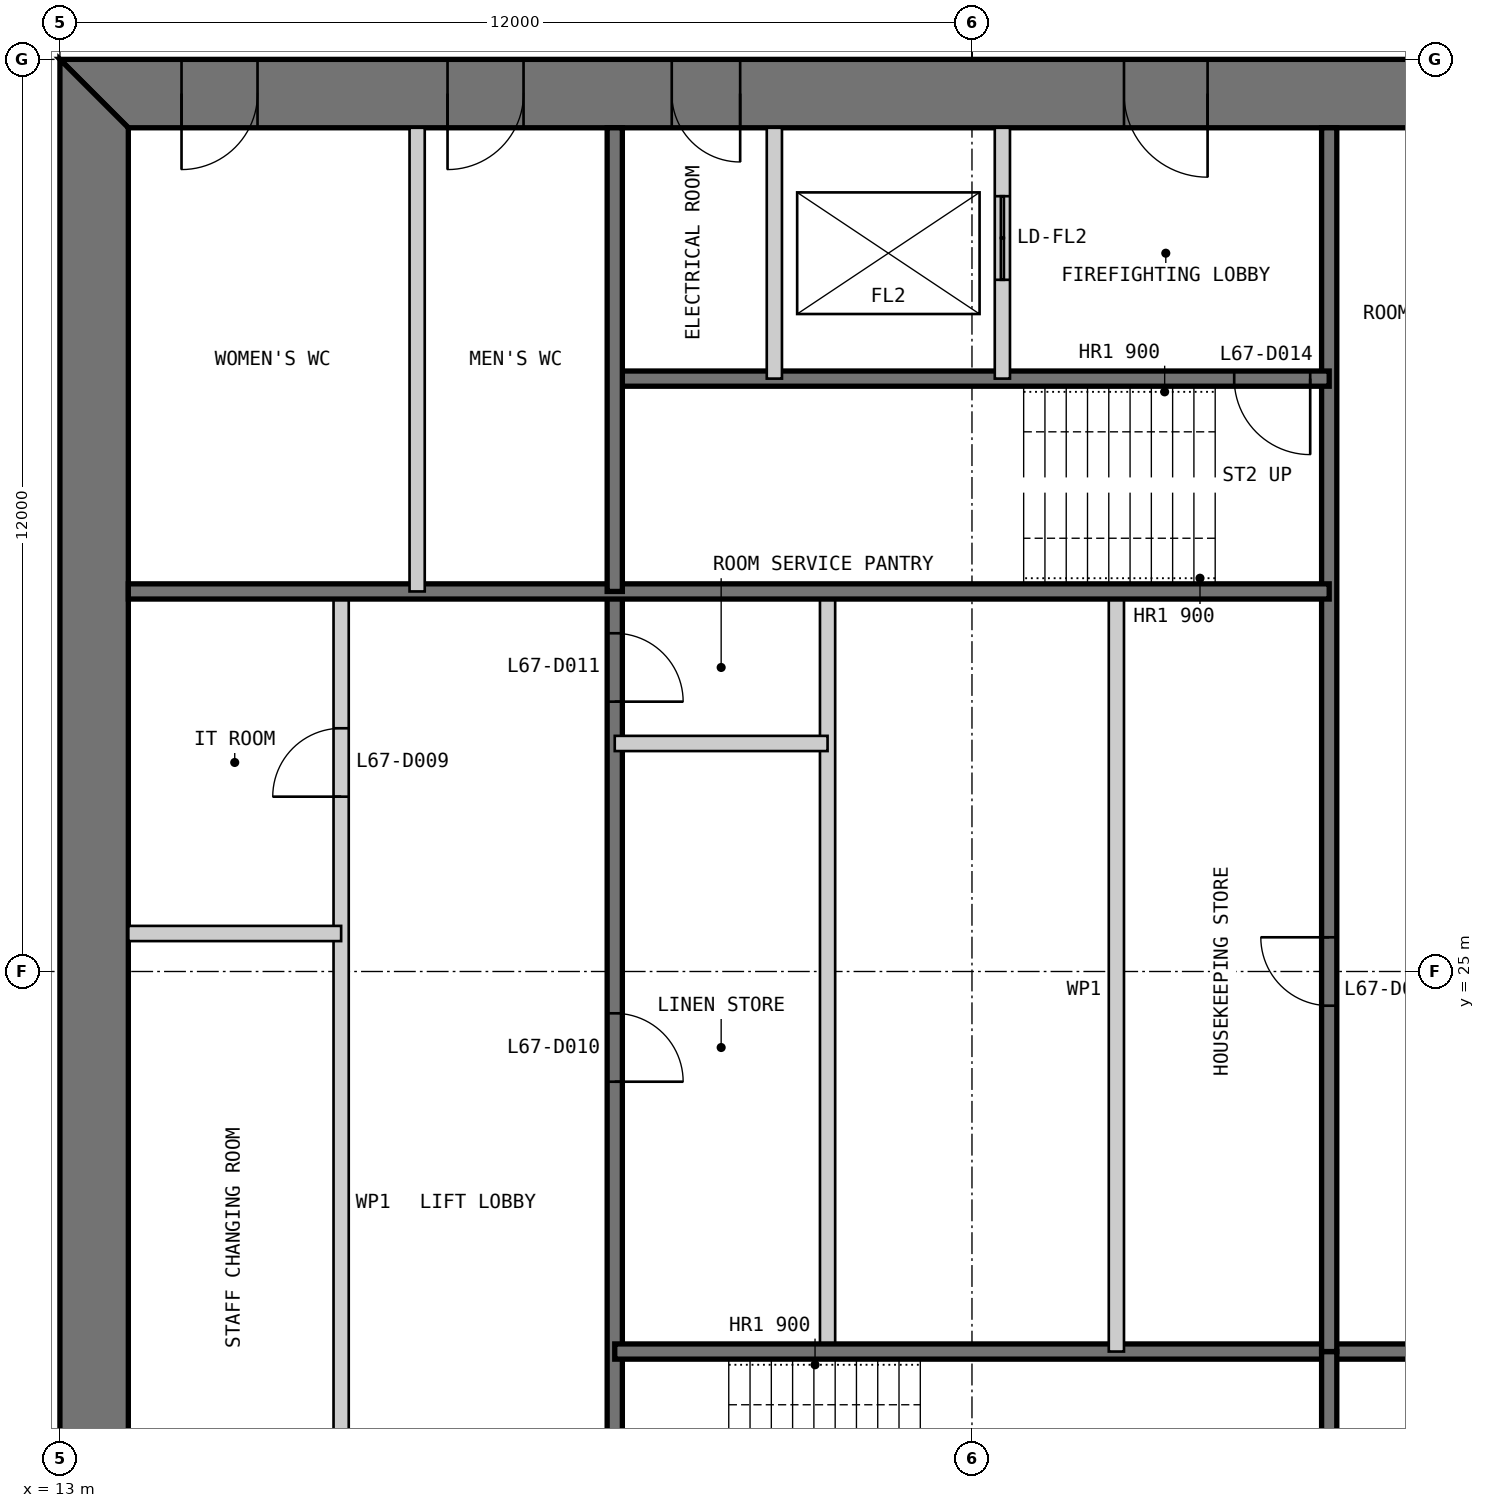
"""IFC4 building model, lengths in metres.
Left out: names, types, materials, properties, quantities, classifications, styles, units other than length and angle.
Written with IfcOpenShell. Run it as: python <this file> out.ifc"""

import sys

from ifc_helpers import new_model, si_unit, direction, frame, frame_2d, origin, place, context, subcontext, project, spatial, polyline, rectangle, outline, extrude, element, fill, save


model = new_model("IFC4")
c1 = context("Model", 3, precision=1e-05, world=origin(), true_north=direction((0.0, 1.0)))
c2 = subcontext(c1, "Body", "Model", "MODEL_VIEW")
j1 = project(units=[si_unit("LENGTHUNIT", "METRE"), si_unit("PLANEANGLEUNIT", "RADIAN")], contexts=[c1])
p1 = place(None, origin())
s1 = spatial("IfcSite", under=j1, at=p1, CompositionType="ELEMENT")
p2 = place(p1, origin())
s2 = spatial("IfcBuilding", under=s1, at=p2, CompositionType="ELEMENT")
p3 = place(p2, frame((0.0, 0.0, 279.8)))
s3 = spatial("IfcBuildingStorey", under=s2, at=p3, CompositionType="ELEMENT", Elevation=279.8)
p4 = place(p3, frame((37.0, 36.55, 0.0), z_axis=(0.0, 0.0, 1.0), x_axis=(-1.0, 0.0, 0.0)))
e1 = element("IfcWall", 1, at=p4, inside=s3, PredefinedType="SHEAR", context=c2, shape_type="SweptSolid", body=[
    extrude(outline(polyline([(0.0, -0.45), (24.0, -0.45), (23.1, 0.45), (0.9, 0.45), (0.0, -0.45)])), origin(), (0.0, 0.0, 1.0), 3.4),
])
p5 = place(p4, frame((4.9, 0.0, 0.0)))
e2 = element("IfcOpeningElement", 2, at=p5, cuts=e1, PredefinedType="OPENING", context=c2, shape_type="SweptSolid", body=[
    extrude(rectangle(XDim=1.0, YDim=2.2, at=frame_2d((0.5, 1.1))), frame((0.0, 0.46, 0.0), z_axis=(0.0, -1.0, 0.0), x_axis=(1.0, 0.0, 0.0)), (0.0, 0.0, 1.0), 0.92),
])
p6 = place(p4, frame((8.9, 0.0, 0.0)))
e3 = element("IfcOpeningElement", 3, at=p6, cuts=e1, PredefinedType="OPENING", context=c2, shape_type="SweptSolid", body=[
    extrude(rectangle(XDim=1.1, YDim=2.2, at=frame_2d((0.55, 1.1))), frame((0.0, 0.46, 0.0), z_axis=(0.0, -1.0, 0.0), x_axis=(1.0, 0.0, 0.0)), (0.0, 0.0, 1.0), 0.92),
])
p7 = place(p4, frame((15.05, 0.0, 0.0)))
e4 = element("IfcOpeningElement", 4, at=p7, cuts=e1, PredefinedType="OPENING", context=c2, shape_type="SweptSolid", body=[
    extrude(rectangle(XDim=0.9, YDim=2.2, at=frame_2d((0.45, 1.1))), frame((0.0, 0.46, 0.0), z_axis=(0.0, -1.0, 0.0), x_axis=(1.0, 0.0, 0.0)), (0.0, 0.0, 1.0), 0.92),
])
p8 = place(p4, frame((17.9, 0.0, 0.0)))
e5 = element("IfcOpeningElement", 5, at=p8, cuts=e1, PredefinedType="OPENING", context=c2, shape_type="SweptSolid", body=[
    extrude(rectangle(XDim=1.0, YDim=2.2, at=frame_2d((0.5, 1.1))), frame((0.0, 0.46, 0.0), z_axis=(0.0, -1.0, 0.0), x_axis=(1.0, 0.0, 0.0)), (0.0, 0.0, 1.0), 0.92),
])
p9 = place(p4, frame((21.4, 0.0, 0.0)))
e6 = element("IfcOpeningElement", 6, at=p9, cuts=e1, PredefinedType="OPENING", context=c2, shape_type="SweptSolid", body=[
    extrude(rectangle(XDim=1.0, YDim=2.2, at=frame_2d((0.5, 1.1))), frame((0.0, 0.46, 0.0), z_axis=(0.0, -1.0, 0.0), x_axis=(1.0, 0.0, 0.0)), (0.0, 0.0, 1.0), 0.92),
])
p10 = place(p3, frame((13.45, 36.1, 0.0), z_axis=(0.0, 0.0, 1.0), x_axis=(0.0, -1.0, 0.0)))
e7 = element("IfcWall", 7, at=p10, inside=s3, PredefinedType="SHEAR", context=c2, shape_type="SweptSolid", body=[
    extrude(outline(polyline([(-0.9, -0.45), (23.1, -0.45), (22.2, 0.45), (0.0, 0.45), (-0.9, -0.45)])), origin(), (0.0, 0.0, 1.0), 3.4),
])
p11 = place(p10, frame((20.2, 0.0, 0.0)))
e8 = element("IfcOpeningElement", 8, at=p11, cuts=e7, PredefinedType="OPENING", context=c2, shape_type="SweptSolid", body=[
    extrude(rectangle(XDim=1.0, YDim=2.2, at=frame_2d((0.5, 1.1))), frame((0.0, 0.46, 0.0), z_axis=(0.0, -1.0, 0.0), x_axis=(1.0, 0.0, 0.0)), (0.0, 0.0, 1.0), 0.92),
])
p12 = place(p10, frame((17.25, 0.0, 0.0)))
e9 = element("IfcOpeningElement", 9, at=p12, cuts=e7, PredefinedType="OPENING", context=c2, shape_type="SweptSolid", body=[
    extrude(rectangle(XDim=0.9, YDim=2.2, at=frame_2d((0.45, 1.1))), frame((0.0, 0.46, 0.0), z_axis=(0.0, -1.0, 0.0), x_axis=(1.0, 0.0, 0.0)), (0.0, 0.0, 1.0), 0.92),
])
p13 = place(p3, frame((16.7, 13.9, 0.0), z_axis=(0.0, 0.0, 1.0), x_axis=(0.0, 1.0, 0.0)))
e10 = element("IfcWall", 10, at=p13, inside=s3, PredefinedType="PARTITIONING", context=c2, shape_type="SweptSolid", body=[
    extrude(rectangle(XDim=16.1, YDim=0.2, at=frame_2d((8.05, 0.0))), origin(), (0.0, 0.0, 1.0), 3.2),
])
p14 = place(p13, frame((13.4, 0.0, 0.0)))
e11 = element("IfcOpeningElement", 11, at=p14, cuts=e10, PredefinedType="OPENING", context=c2, shape_type="SweptSolid", body=[
    extrude(rectangle(XDim=0.9, YDim=2.2, at=frame_2d((0.45, 1.1))), frame((0.0, 0.11, 0.0), z_axis=(0.0, -1.0, 0.0), x_axis=(1.0, 0.0, 0.0)), (0.0, 0.0, 1.0), 0.22),
])
p15 = place(p3, frame((20.3, 13.9, 0.0), z_axis=(0.0, 0.0, 1.0), x_axis=(0.0, 1.0, 0.0)))
e12 = element("IfcWall", 12, at=p15, inside=s3, PredefinedType="SOLIDWALL", context=c2, shape_type="SweptSolid", body=[
    extrude(rectangle(XDim=16.1, YDim=0.2, at=frame_2d((8.05, 0.0))), origin(), (0.0, 0.0, 1.0), 3.2),
])
p16 = place(p15, frame((9.65, 0.0, 0.0)))
e13 = element("IfcOpeningElement", 13, at=p16, cuts=e12, PredefinedType="OPENING", context=c2, shape_type="SweptSolid", body=[
    extrude(rectangle(XDim=0.9, YDim=2.2, at=frame_2d((0.45, 1.1))), frame((0.0, 0.11, 0.0), z_axis=(0.0, -1.0, 0.0), x_axis=(1.0, 0.0, 0.0)), (0.0, 0.0, 1.0), 0.22),
])
p17 = place(p15, frame((14.65, 0.0, 0.0)))
e14 = element("IfcOpeningElement", 14, at=p17, cuts=e12, PredefinedType="OPENING", context=c2, shape_type="SweptSolid", body=[
    extrude(rectangle(XDim=0.9, YDim=2.2, at=frame_2d((0.45, 1.1))), frame((0.0, 0.11, 0.0), z_axis=(0.0, -1.0, 0.0), x_axis=(1.0, 0.0, 0.0)), (0.0, 0.0, 1.0), 0.22),
])
p18 = place(p3, frame((23.1, 20.0, 0.0), z_axis=(0.0, 0.0, 1.0), x_axis=(0.0, 1.0, 0.0)))
e15 = element("IfcWall", 15, at=p18, inside=s3, PredefinedType="PARTITIONING", context=c2, shape_type="SweptSolid", body=[
    extrude(rectangle(XDim=10.0, YDim=0.2, at=frame_2d((5.0, 0.0))), origin(), (0.0, 0.0, 1.0), 3.2),
])
p19 = place(p3, frame((20.3, 20.0, 0.0), z_axis=(0.0, 0.0, 1.0), x_axis=(1.0, 0.0, 0.0)))
e16 = element("IfcWall", 16, at=p19, inside=s3, PredefinedType="SOLIDWALL", context=c2, shape_type="SweptSolid", body=[
    extrude(rectangle(XDim=15.8, YDim=0.2, at=frame_2d((7.9, 0.0))), origin(), (0.0, 0.0, 1.0), 3.2),
])
p20 = place(p3, frame((29.7, 13.9, 0.0), z_axis=(0.0, 0.0, 1.0), x_axis=(0.0, 1.0, 0.0)))
e17 = element("IfcWall", 17, at=p20, inside=s3, PredefinedType="SOLIDWALL", context=c2, shape_type="SweptSolid", body=[
    extrude(rectangle(XDim=6.1, YDim=0.2, at=frame_2d((3.05, 0.0))), origin(), (0.0, 0.0, 1.0), 3.2),
])
for number, where, z_axis, x_axis in (
    (18, (13.9, 25.5, 0.0), (0.0, 0.0, 1.0), (1.0, 0.0, 0.0)),
    (19, (20.3, 28.0, 0.0), (0.0, 0.0, 1.0), (1.0, 0.0, 0.0)),
):
    element("IfcWall", number, at=place(p3, frame(where, z_axis=z_axis, x_axis=x_axis)), inside=s3, PredefinedType="PARTITIONING", context=c2, shape_type="SweptSolid", body=[
        extrude(rectangle(XDim=2.8, YDim=0.2, at=frame_2d((1.4, 0.0))), origin(), (0.0, 0.0, 1.0), 3.2),
    ])
p21 = place(p3, frame((29.7, 36.1, 0.0), z_axis=(0.0, 0.0, 1.0), x_axis=(0.0, -1.0, 0.0)))
e20 = element("IfcWall", 20, at=p21, inside=s3, PredefinedType="SOLIDWALL", context=c2, shape_type="SweptSolid", body=[
    extrude(rectangle(XDim=16.1, YDim=0.2, at=frame_2d((8.05, 0.0))), origin(), (0.0, 0.0, 1.0), 3.2),
])
p22 = place(p21, frame((10.65, 0.0, 0.0)))
e21 = element("IfcOpeningElement", 21, at=p22, cuts=e20, PredefinedType="OPENING", context=c2, shape_type="SweptSolid", body=[
    extrude(rectangle(XDim=0.9, YDim=2.2, at=frame_2d((0.45, 1.1))), frame((0.0, 0.11, 0.0), z_axis=(0.0, -1.0, 0.0), x_axis=(1.0, 0.0, 0.0)), (0.0, 0.0, 1.0), 0.22),
])
p23 = place(p3, frame((26.9, 30.0, 0.0), z_axis=(0.0, 0.0, 1.0), x_axis=(0.0, -1.0, 0.0)))
e22 = element("IfcWall", 22, at=p23, inside=s3, PredefinedType="PARTITIONING", context=c2, shape_type="SweptSolid", body=[
    extrude(rectangle(XDim=10.0, YDim=0.2, at=frame_2d((5.0, 0.0))), origin(), (0.0, 0.0, 1.0), 3.2),
])
p24 = place(p3, frame((29.7, 32.8, 0.0), z_axis=(0.0, 0.0, 1.0), x_axis=(-1.0, 0.0, 0.0)))
e23 = element("IfcWall", 23, at=p24, inside=s3, PredefinedType="SOLIDWALL", context=c2, shape_type="SweptSolid", body=[
    extrude(rectangle(XDim=9.4, YDim=0.2, at=frame_2d((4.7, 0.0))), origin(), (0.0, 0.0, 1.0), 3.2),
])
p25 = place(p24, frame((0.25, 0.0, 0.0)))
e24 = element("IfcOpeningElement", 24, at=p25, cuts=e23, PredefinedType="OPENING", context=c2, shape_type="SweptSolid", body=[
    extrude(rectangle(XDim=1.0, YDim=2.2, at=frame_2d((0.5, 1.1))), frame((0.0, 0.11, 0.0), z_axis=(0.0, -1.0, 0.0), x_axis=(1.0, 0.0, 0.0)), (0.0, 0.0, 1.0), 0.22),
])
p26 = place(p3, frame((29.7, 30.0, 0.0), z_axis=(0.0, 0.0, 1.0), x_axis=(-1.0, 0.0, 0.0)))
e25 = element("IfcWall", 25, at=p26, inside=s3, PredefinedType="SOLIDWALL", context=c2, shape_type="SweptSolid", body=[
    extrude(rectangle(XDim=15.8, YDim=0.2, at=frame_2d((7.9, 0.0))), origin(), (0.0, 0.0, 1.0), 3.2),
])
p27 = place(p3, frame((25.4, 36.1, 0.0), z_axis=(0.0, 0.0, 1.0), x_axis=(0.0, -1.0, 0.0)))
e26 = element("IfcWall", 26, at=p27, inside=s3, PredefinedType="PARTITIONING", context=c2, shape_type="SweptSolid", body=[
    extrude(rectangle(XDim=3.3, YDim=0.2, at=frame_2d((1.65, 0.0))), origin(), (0.0, 0.0, 1.0), 3.2),
])
p28 = place(p27, frame((0.9, 0.0, 0.0)))
e27 = element("IfcOpeningElement", 27, at=p28, cuts=e26, PredefinedType="OPENING", context=c2, shape_type="SweptSolid", body=[
    extrude(rectangle(XDim=1.1, YDim=2.2, at=frame_2d((0.55, 1.1))), frame((0.0, 0.11, 0.0), z_axis=(0.0, -1.0, 0.0), x_axis=(1.0, 0.0, 0.0)), (0.0, 0.0, 1.0), 0.22),
])
p29 = place(p3, frame((22.4, 36.1, 0.0), z_axis=(0.0, 0.0, 1.0), x_axis=(0.0, -1.0, 0.0)))
e28 = element("IfcWall", 28, at=p29, inside=s3, PredefinedType="PARTITIONING", context=c2, shape_type="SweptSolid", body=[
    extrude(rectangle(XDim=3.3, YDim=0.2, at=frame_2d((1.65, 0.0))), origin(), (0.0, 0.0, 1.0), 3.2),
])
p30 = place(p3, frame((20.3, 36.1, 0.0), z_axis=(0.0, 0.0, 1.0), x_axis=(0.0, -1.0, 0.0)))
e29 = element("IfcWall", 29, at=p30, inside=s3, PredefinedType="SOLIDWALL", context=c2, shape_type="SweptSolid", body=[
    extrude(rectangle(XDim=6.1, YDim=0.2, at=frame_2d((3.05, 0.0))), origin(), (0.0, 0.0, 1.0), 3.2),
])
p31 = place(p3, frame((17.7, 36.1, 0.0), z_axis=(0.0, 0.0, 1.0), x_axis=(0.0, -1.0, 0.0)))
e30 = element("IfcWall", 30, at=p31, inside=s3, PredefinedType="PARTITIONING", context=c2, shape_type="SweptSolid", body=[
    extrude(rectangle(XDim=6.1, YDim=0.2, at=frame_2d((3.05, 0.0))), origin(), (0.0, 0.0, 1.0), 3.2),
])
p32 = place(p14, origin())
e31 = element("IfcDoor", 31, at=p32, inside=s3, OperationType="SINGLE_SWING_LEFT", PredefinedType="DOOR", context=c2, shape_type="SweptSolid", body=[
    extrude(rectangle(XDim=0.9, YDim=2.2, at=frame_2d((0.45, 1.1))), frame((0.0, 0.025, 0.0), z_axis=(0.0, -1.0, 0.0), x_axis=(1.0, 0.0, 0.0)), (0.0, 0.0, 1.0), 0.05),
])
fill(e11, e31)
p33 = place(p16, frame((0.9, 0.0, 0.0), z_axis=(0.0, 0.0, 1.0), x_axis=(-1.0, 0.0, 0.0)))
e32 = element("IfcDoor", 32, at=p33, inside=s3, OperationType="SINGLE_SWING_RIGHT", PredefinedType="DOOR", context=c2, shape_type="SweptSolid", body=[
    extrude(rectangle(XDim=0.9, YDim=2.2, at=frame_2d((0.45, 1.1))), frame((0.0, 0.025, 0.0), z_axis=(0.0, -1.0, 0.0), x_axis=(1.0, 0.0, 0.0)), (0.0, 0.0, 1.0), 0.05),
])
fill(e13, e32)
p34 = place(p17, frame((0.9, 0.0, 0.0), z_axis=(0.0, 0.0, 1.0), x_axis=(-1.0, 0.0, 0.0)))
e33 = element("IfcDoor", 33, at=p34, inside=s3, OperationType="SINGLE_SWING_RIGHT", PredefinedType="DOOR", context=c2, shape_type="SweptSolid", body=[
    extrude(rectangle(XDim=0.9, YDim=2.2, at=frame_2d((0.45, 1.1))), frame((0.0, 0.025, 0.0), z_axis=(0.0, -1.0, 0.0), x_axis=(1.0, 0.0, 0.0)), (0.0, 0.0, 1.0), 0.05),
])
fill(e14, e33)
p35 = place(p6, origin())
e34 = element("IfcDoor", 34, at=p35, inside=s3, OperationType="SINGLE_SWING_LEFT", PredefinedType="DOOR", context=c2, shape_type="SweptSolid", body=[
    extrude(rectangle(XDim=1.1, YDim=2.2, at=frame_2d((0.55, 1.1))), frame((0.0, 0.025, 0.0), z_axis=(0.0, -1.0, 0.0), x_axis=(1.0, 0.0, 0.0)), (0.0, 0.0, 1.0), 0.05),
    extrude(outline(polyline([(0.0, 0.0), (0.04, 0.0), (0.04, 2.16), (1.06, 2.16), (1.06, 0.0), (1.1, 0.0), (1.1, 2.2), (0.0, 2.2), (0.0, 0.0)])), frame((0.0, 0.3, 0.0), z_axis=(0.0, -1.0, 0.0), x_axis=(1.0, 0.0, 0.0)), (0.0, 0.0, 1.0), 0.6),
])
fill(e3, e34)
p36 = place(p25, origin())
e35 = element("IfcDoor", 35, at=p36, inside=s3, OperationType="SINGLE_SWING_LEFT", PredefinedType="DOOR", context=c2, shape_type="SweptSolid", body=[
    extrude(rectangle(XDim=1.0, YDim=2.2, at=frame_2d((0.5, 1.1))), frame((0.0, 0.025, 0.0), z_axis=(0.0, -1.0, 0.0), x_axis=(1.0, 0.0, 0.0)), (0.0, 0.0, 1.0), 0.05),
])
fill(e24, e35)
p37 = place(p7, origin())
e36 = element("IfcDoor", 36, at=p37, inside=s3, OperationType="SINGLE_SWING_LEFT", PredefinedType="DOOR", context=c2, shape_type="SweptSolid", body=[
    extrude(rectangle(XDim=0.9, YDim=2.2, at=frame_2d((0.45, 1.1))), frame((0.0, 0.025, 0.0), z_axis=(0.0, -1.0, 0.0), x_axis=(1.0, 0.0, 0.0)), (0.0, 0.0, 1.0), 0.05),
    extrude(outline(polyline([(0.0, 0.0), (0.04, 0.0), (0.04, 2.16), (0.86, 2.16), (0.86, 0.0), (0.9, 0.0), (0.9, 2.2), (0.0, 2.2), (0.0, 0.0)])), frame((0.0, 0.3, 0.0), z_axis=(0.0, -1.0, 0.0), x_axis=(1.0, 0.0, 0.0)), (0.0, 0.0, 1.0), 0.6),
])
fill(e4, e36)
p38 = place(p8, origin())
e37 = element("IfcDoor", 37, at=p38, inside=s3, OperationType="SINGLE_SWING_RIGHT", PredefinedType="DOOR", context=c2, shape_type="SweptSolid", body=[
    extrude(rectangle(XDim=1.0, YDim=2.2, at=frame_2d((0.5, 1.1))), frame((0.0, 0.025, 0.0), z_axis=(0.0, -1.0, 0.0), x_axis=(1.0, 0.0, 0.0)), (0.0, 0.0, 1.0), 0.05),
    extrude(outline(polyline([(0.0, 0.0), (0.04, 0.0), (0.04, 2.16), (0.96, 2.16), (0.96, 0.0), (1.0, 0.0), (1.0, 2.2), (0.0, 2.2), (0.0, 0.0)])), frame((0.0, 0.3, 0.0), z_axis=(0.0, -1.0, 0.0), x_axis=(1.0, 0.0, 0.0)), (0.0, 0.0, 1.0), 0.6),
])
fill(e5, e37)
p39 = place(p9, origin())
e38 = element("IfcDoor", 38, at=p39, inside=s3, OperationType="SINGLE_SWING_RIGHT", PredefinedType="DOOR", context=c2, shape_type="SweptSolid", body=[
    extrude(rectangle(XDim=1.0, YDim=2.2, at=frame_2d((0.5, 1.1))), frame((0.0, 0.025, 0.0), z_axis=(0.0, -1.0, 0.0), x_axis=(1.0, 0.0, 0.0)), (0.0, 0.0, 1.0), 0.05),
    extrude(outline(polyline([(0.0, 0.0), (0.04, 0.0), (0.04, 2.16), (0.96, 2.16), (0.96, 0.0), (1.0, 0.0), (1.0, 2.2), (0.0, 2.2), (0.0, 0.0)])), frame((0.0, 0.3, 0.0), z_axis=(0.0, -1.0, 0.0), x_axis=(1.0, 0.0, 0.0)), (0.0, 0.0, 1.0), 0.6),
])
fill(e6, e38)
p40 = place(p22, frame((0.9, 0.0, 0.0), z_axis=(0.0, 0.0, 1.0), x_axis=(-1.0, 0.0, 0.0)))
e39 = element("IfcDoor", 39, at=p40, inside=s3, OperationType="SINGLE_SWING_RIGHT", PredefinedType="DOOR", context=c2, shape_type="SweptSolid", body=[
    extrude(rectangle(XDim=0.9, YDim=2.2, at=frame_2d((0.45, 1.1))), frame((0.0, 0.025, 0.0), z_axis=(0.0, -1.0, 0.0), x_axis=(1.0, 0.0, 0.0)), (0.0, 0.0, 1.0), 0.05),
])
fill(e21, e39)
p41 = place(p28, origin())
e40 = element("IfcDoor", 40, at=p41, inside=s3, OperationType="DOUBLE_DOOR_SLIDING", PredefinedType="DOOR", context=c2, shape_type="SweptSolid", body=[
    extrude(rectangle(XDim=1.1, YDim=2.2, at=frame_2d((0.55, 1.1))), frame((0.0, 0.025, 0.0), z_axis=(0.0, -1.0, 0.0), x_axis=(1.0, 0.0, 0.0)), (0.0, 0.0, 1.0), 0.05),
])
fill(e27, e40)
save(model, sys.argv[1])
